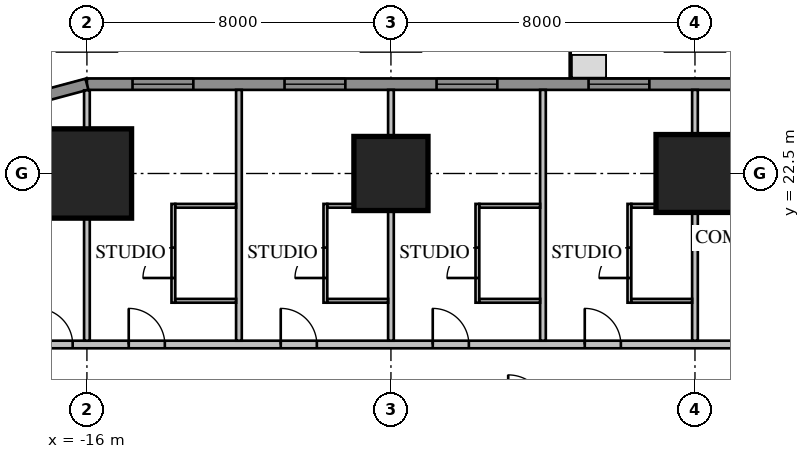
"""IFC4 building model, lengths in metres.
Left out: names, types, materials, properties, quantities, classifications, styles, units other than length and angle.
Written with IfcOpenShell. Run it as: python <this file> out.ifc"""

import sys

from ifc_helpers import new_model, si_unit, direction, frame, frame_2d, origin, origin_2d, place, context, subcontext, project, spatial, rectangle, extrude, element, fill, save


model = new_model("IFC4")
c1 = context("Model", 3, precision=1e-05, world=origin(), true_north=direction((0.0, 1.0)))
c2 = subcontext(c1, "Body", "Model", "MODEL_VIEW")
j1 = project(units=[si_unit("LENGTHUNIT", "METRE"), si_unit("PLANEANGLEUNIT", "RADIAN")], contexts=[c1])
p1 = place(None, origin())
s1 = spatial("IfcSite", under=j1, at=p1, CompositionType="ELEMENT")
p2 = place(p1, origin())
s2 = spatial("IfcBuilding", under=s1, at=p2, CompositionType="ELEMENT")
p3 = place(p2, frame((0.0, 0.0, 42.95)))
s3 = spatial("IfcBuildingStorey", under=s2, at=p3, CompositionType="ELEMENT", Elevation=42.95)
p4 = place(p3, frame((0.0, 22.5, 0.0), z_axis=(0.0, 0.0, 1.0), x_axis=(1.0, 0.0, 0.0)))
e1 = element("IfcColumn", 1, at=p4, inside=s3, PredefinedType="COLUMN", context=c2, shape_type="SweptSolid", body=[
    extrude(rectangle(XDim=2.05, YDim=2.05, at=origin_2d()), origin(), (0.0, 0.0, 1.0), 3.85),
])
p5 = place(p3, frame((-8.0, 22.5, 0.0), z_axis=(0.0, 0.0, 1.0), x_axis=(1.0, 0.0, 0.0)))
e2 = element("IfcColumn", 2, at=p5, inside=s3, PredefinedType="COLUMN", context=c2, shape_type="SweptSolid", body=[
    extrude(rectangle(XDim=1.95, YDim=1.95, at=origin_2d()), origin(), (0.0, 0.0, 1.0), 3.85),
])
p6 = place(p3, frame((-16.0, 22.5, 0.0), z_axis=(0.0, 0.0, 1.0), x_axis=(1.0, 0.0, 0.0)))
e3 = element("IfcColumn", 3, at=p6, inside=s3, PredefinedType="COLUMN", context=c2, shape_type="SweptSolid", body=[
    extrude(rectangle(XDim=2.35, YDim=2.35, at=origin_2d()), origin(), (0.0, 0.0, 1.0), 3.85),
])
p7 = place(p3, frame((16.0, 24.85, 0.0), z_axis=(0.0, 0.0, 1.0), x_axis=(-1.0, 0.0, 0.0)))
e4 = element("IfcWall", 4, at=p7, inside=s3, PredefinedType="SOLIDWALL", context=c2, shape_type="SweptSolid", body=[
    extrude(rectangle(XDim=32.0, YDim=0.3, at=frame_2d((16.0, 0.0))), origin(), (0.0, 0.0, 1.0), 3.65),
])
p8 = place(p7, frame((1.2, 0.0, 0.75)))
e5 = element("IfcOpeningElement", 5, at=p8, cuts=e4, PredefinedType="OPENING", context=c2, shape_type="SweptSolid", body=[
    extrude(rectangle(XDim=1.6, YDim=1.8, at=frame_2d((0.8, 0.9))), frame((0.0, 0.17, 0.0), z_axis=(0.0, -1.0, 0.0), x_axis=(1.0, 0.0, 0.0)), (0.0, 0.0, 1.0), 0.34),
])
p9 = place(p7, frame((5.2, 0.0, 0.75)))
e6 = element("IfcOpeningElement", 6, at=p9, cuts=e4, PredefinedType="OPENING", context=c2, shape_type="SweptSolid", body=[
    extrude(rectangle(XDim=1.6, YDim=1.8, at=frame_2d((0.8, 0.9))), frame((0.0, 0.17, 0.0), z_axis=(0.0, -1.0, 0.0), x_axis=(1.0, 0.0, 0.0)), (0.0, 0.0, 1.0), 0.34),
])
p10 = place(p7, frame((17.2, 0.0, 0.75)))
e7 = element("IfcOpeningElement", 7, at=p10, cuts=e4, PredefinedType="OPENING", context=c2, shape_type="SweptSolid", body=[
    extrude(rectangle(XDim=1.6, YDim=1.8, at=frame_2d((0.8, 0.9))), frame((0.0, 0.17, 0.0), z_axis=(0.0, -1.0, 0.0), x_axis=(1.0, 0.0, 0.0)), (0.0, 0.0, 1.0), 0.34),
])
p11 = place(p7, frame((21.2, 0.0, 0.75)))
e8 = element("IfcOpeningElement", 8, at=p11, cuts=e4, PredefinedType="OPENING", context=c2, shape_type="SweptSolid", body=[
    extrude(rectangle(XDim=1.6, YDim=1.8, at=frame_2d((0.8, 0.9))), frame((0.0, 0.17, 0.0), z_axis=(0.0, -1.0, 0.0), x_axis=(1.0, 0.0, 0.0)), (0.0, 0.0, 1.0), 0.34),
])
p12 = place(p7, frame((25.2, 0.0, 0.75)))
e9 = element("IfcOpeningElement", 9, at=p12, cuts=e4, PredefinedType="OPENING", context=c2, shape_type="SweptSolid", body=[
    extrude(rectangle(XDim=1.6, YDim=1.8, at=frame_2d((0.8, 0.9))), frame((0.0, 0.17, 0.0), z_axis=(0.0, -1.0, 0.0), x_axis=(1.0, 0.0, 0.0)), (0.0, 0.0, 1.0), 0.34),
])
p13 = place(p7, frame((29.2, 0.0, 0.75)))
e10 = element("IfcOpeningElement", 10, at=p13, cuts=e4, PredefinedType="OPENING", context=c2, shape_type="SweptSolid", body=[
    extrude(rectangle(XDim=1.6, YDim=1.8, at=frame_2d((0.8, 0.9))), frame((0.0, 0.17, 0.0), z_axis=(0.0, -1.0, 0.0), x_axis=(1.0, 0.0, 0.0)), (0.0, 0.0, 1.0), 0.34),
])
p14 = place(p7, frame((8.8, 0.0, 0.75)))
e11 = element("IfcOpeningElement", 11, at=p14, cuts=e4, PredefinedType="OPENING", context=c2, shape_type="SweptSolid", body=[
    extrude(rectangle(XDim=2.4, YDim=1.8, at=frame_2d((1.2, 0.9))), frame((0.0, 0.17, 0.0), z_axis=(0.0, -1.0, 0.0), x_axis=(1.0, 0.0, 0.0)), (0.0, 0.0, 1.0), 0.34),
])
p15 = place(p7, frame((13.812, 0.0, 0.0)))
e12 = element("IfcOpeningElement", 12, at=p15, cuts=e4, PredefinedType="OPENING", context=c2, shape_type="SweptSolid", body=[
    extrude(rectangle(XDim=1.0, YDim=2.4, at=frame_2d((0.5, 1.2))), frame((0.0, 0.17, 0.0), z_axis=(0.0, -1.0, 0.0), x_axis=(1.0, 0.0, 0.0)), (0.0, 0.0, 1.0), 0.34),
])
p16 = place(p3, frame((-16.0, 24.85, 0.0), z_axis=(0.0, 0.0, 1.0), x_axis=(-0.965920218567, -0.258839972501, 0.0)))
e13 = element("IfcWall", 13, at=p16, inside=s3, PredefinedType="SOLIDWALL", context=c2, shape_type="SweptSolid", body=[
    extrude(rectangle(XDim=4.581, YDim=0.3, at=frame_2d((2.291, 0.0))), origin(), (0.0, 0.0, 1.0), 3.65),
])
p17 = place(p3, frame((18.0, 18.0, 0.0), z_axis=(0.0, 0.0, 1.0), x_axis=(-1.0, 0.0, 0.0)))
e14 = element("IfcWall", 14, at=p17, inside=s3, PredefinedType="PARTITIONING", context=c2, shape_type="SweptSolid", body=[
    extrude(rectangle(XDim=36.0, YDim=0.2, at=frame_2d((18.0, 0.0))), origin(), (0.0, 0.0, 1.0), 3.65),
])
p18 = place(p17, frame((0.375, 0.0, 0.0)))
e15 = element("IfcOpeningElement", 15, at=p18, cuts=e14, PredefinedType="OPENING", context=c2, shape_type="SweptSolid", body=[
    extrude(rectangle(XDim=1.0, YDim=2.1, at=frame_2d((0.5, 1.05))), frame((0.0, 0.12, 0.0), z_axis=(0.0, -1.0, 0.0), x_axis=(1.0, 0.0, 0.0)), (0.0, 0.0, 1.0), 0.24),
])
p19 = place(p17, frame((3.95, 0.0, 0.0)))
e16 = element("IfcOpeningElement", 16, at=p19, cuts=e14, PredefinedType="OPENING", context=c2, shape_type="SweptSolid", body=[
    extrude(rectangle(XDim=0.95, YDim=2.1, at=frame_2d((0.475, 1.05))), frame((0.0, 0.12, 0.0), z_axis=(0.0, -1.0, 0.0), x_axis=(1.0, 0.0, 0.0)), (0.0, 0.0, 1.0), 0.24),
])
p20 = place(p17, frame((7.95, 0.0, 0.0)))
e17 = element("IfcOpeningElement", 17, at=p20, cuts=e14, PredefinedType="OPENING", context=c2, shape_type="SweptSolid", body=[
    extrude(rectangle(XDim=0.95, YDim=2.1, at=frame_2d((0.475, 1.05))), frame((0.0, 0.12, 0.0), z_axis=(0.0, -1.0, 0.0), x_axis=(1.0, 0.0, 0.0)), (0.0, 0.0, 1.0), 0.24),
])
p21 = place(p17, frame((19.95, 0.0, 0.0)))
e18 = element("IfcOpeningElement", 18, at=p21, cuts=e14, PredefinedType="OPENING", context=c2, shape_type="SweptSolid", body=[
    extrude(rectangle(XDim=0.95, YDim=2.1, at=frame_2d((0.475, 1.05))), frame((0.0, 0.12, 0.0), z_axis=(0.0, -1.0, 0.0), x_axis=(1.0, 0.0, 0.0)), (0.0, 0.0, 1.0), 0.24),
])
p22 = place(p17, frame((23.95, 0.0, 0.0)))
e19 = element("IfcOpeningElement", 19, at=p22, cuts=e14, PredefinedType="OPENING", context=c2, shape_type="SweptSolid", body=[
    extrude(rectangle(XDim=0.95, YDim=2.1, at=frame_2d((0.475, 1.05))), frame((0.0, 0.12, 0.0), z_axis=(0.0, -1.0, 0.0), x_axis=(1.0, 0.0, 0.0)), (0.0, 0.0, 1.0), 0.24),
])
p23 = place(p17, frame((27.95, 0.0, 0.0)))
e20 = element("IfcOpeningElement", 20, at=p23, cuts=e14, PredefinedType="OPENING", context=c2, shape_type="SweptSolid", body=[
    extrude(rectangle(XDim=0.95, YDim=2.1, at=frame_2d((0.475, 1.05))), frame((0.0, 0.12, 0.0), z_axis=(0.0, -1.0, 0.0), x_axis=(1.0, 0.0, 0.0)), (0.0, 0.0, 1.0), 0.24),
])
p24 = place(p17, frame((31.95, 0.0, 0.0)))
e21 = element("IfcOpeningElement", 21, at=p24, cuts=e14, PredefinedType="OPENING", context=c2, shape_type="SweptSolid", body=[
    extrude(rectangle(XDim=0.95, YDim=2.1, at=frame_2d((0.475, 1.05))), frame((0.0, 0.12, 0.0), z_axis=(0.0, -1.0, 0.0), x_axis=(1.0, 0.0, 0.0)), (0.0, 0.0, 1.0), 0.24),
])
p25 = place(p17, frame((34.375, 0.0, 0.0)))
e22 = element("IfcOpeningElement", 22, at=p25, cuts=e14, PredefinedType="OPENING", context=c2, shape_type="SweptSolid", body=[
    extrude(rectangle(XDim=0.95, YDim=2.1, at=frame_2d((0.475, 1.05))), frame((0.0, 0.12, 0.0), z_axis=(0.0, -1.0, 0.0), x_axis=(1.0, 0.0, 0.0)), (0.0, 0.0, 1.0), 0.24),
])
p26 = place(p17, frame((11.2, 0.0, 0.0)))
e23 = element("IfcOpeningElement", 23, at=p26, cuts=e14, PredefinedType="OPENING", context=c2, shape_type="SweptSolid", body=[
    extrude(rectangle(XDim=1.0, YDim=2.1, at=frame_2d((0.5, 1.05))), frame((0.0, 0.12, 0.0), z_axis=(0.0, -1.0, 0.0), x_axis=(1.0, 0.0, 0.0)), (0.0, 0.0, 1.0), 0.24),
])
p27 = place(p17, frame((15.2, 0.0, 0.0)))
e24 = element("IfcOpeningElement", 24, at=p27, cuts=e14, PredefinedType="OPENING", context=c2, shape_type="SweptSolid", body=[
    extrude(rectangle(XDim=1.0, YDim=2.1, at=frame_2d((0.5, 1.05))), frame((0.0, 0.12, 0.0), z_axis=(0.0, -1.0, 0.0), x_axis=(1.0, 0.0, 0.0)), (0.0, 0.0, 1.0), 0.24),
])
p28 = place(p3, frame((0.0, 18.1, 0.0), z_axis=(0.0, 0.0, 1.0), x_axis=(0.0, 1.0, 0.0)))
e25 = element("IfcWall", 25, at=p28, inside=s3, PredefinedType="PARTITIONING", context=c2, shape_type="SweptSolid", body=[
    extrude(rectangle(XDim=6.6, YDim=0.15, at=frame_2d((3.3, 0.0))), origin(), (0.0, 0.0, 1.0), 2.809),
])
for number, where, z_axis, x_axis in (
    (26, (-4.0, 18.1, 0.0), (0.0, 0.0, 1.0), (0.0, 1.0, 0.0)),
    (27, (-8.0, 18.1, 0.0), (0.0, 0.0, 1.0), (0.0, 1.0, 0.0)),
    (28, (-12.0, 18.1, 0.0), (0.0, 0.0, 1.0), (0.0, 1.0, 0.0)),
):
    element("IfcWall", number, at=place(p3, frame(where, z_axis=z_axis, x_axis=x_axis)), inside=s3, PredefinedType="PARTITIONING", context=c2, shape_type="SweptSolid", body=[
        extrude(rectangle(XDim=6.6, YDim=0.15, at=frame_2d((3.3, 0.0))), origin(), (0.0, 0.0, 1.0), 3.65),
    ])
p29 = place(p3, frame((-16.0, 18.1, 0.0), z_axis=(0.0, 0.0, 1.0), x_axis=(0.0, 1.0, 0.0)))
e29 = element("IfcWall", 29, at=p29, inside=s3, PredefinedType="PARTITIONING", context=c2, shape_type="SweptSolid", body=[
    extrude(rectangle(XDim=6.589, YDim=0.15, at=frame_2d((3.295, 0.0))), origin(), (0.0, 0.0, 1.0), 3.65),
])
p30 = place(p3, frame((-1.725, 19.1, 0.0), z_axis=(0.0, 0.0, 1.0), x_axis=(0.0, 1.0, 0.0)))
e30 = element("IfcWall", 30, at=p30, inside=s3, PredefinedType="PARTITIONING", context=c2, shape_type="SweptSolid", body=[
    extrude(rectangle(XDim=2.6, YDim=0.1, at=frame_2d((1.3, 0.0))), origin(), (0.0, 0.0, 1.0), 3.65),
])
p31 = place(p30, frame((0.65, 0.0, 0.0)))
e31 = element("IfcOpeningElement", 31, at=p31, cuts=e30, PredefinedType="OPENING", context=c2, shape_type="SweptSolid", body=[
    extrude(rectangle(XDim=0.8, YDim=2.1, at=frame_2d((0.4, 1.05))), frame((0.0, 0.07, 0.0), z_axis=(0.0, -1.0, 0.0), x_axis=(1.0, 0.0, 0.0)), (0.0, 0.0, 1.0), 0.14),
])
p32 = place(p3, frame((-0.075, 21.65, 0.0), z_axis=(0.0, 0.0, 1.0), x_axis=(-1.0, 0.0, 0.0)))
e32 = element("IfcWall", 32, at=p32, inside=s3, PredefinedType="PARTITIONING", context=c2, shape_type="SweptSolid", body=[
    extrude(rectangle(XDim=1.6, YDim=0.1, at=frame_2d((0.8, 0.0))), origin(), (0.0, 0.0, 1.0), 3.65),
])
p33 = place(p3, frame((-0.075, 19.15, 0.0), z_axis=(0.0, 0.0, 1.0), x_axis=(-1.0, 0.0, 0.0)))
e33 = element("IfcWall", 33, at=p33, inside=s3, PredefinedType="PARTITIONING", context=c2, shape_type="SweptSolid", body=[
    extrude(rectangle(XDim=1.6, YDim=0.1, at=frame_2d((0.8, 0.0))), origin(), (0.0, 0.0, 1.0), 3.122),
])
p34 = place(p3, frame((-5.725, 19.1, 0.0), z_axis=(0.0, 0.0, 1.0), x_axis=(0.0, 1.0, 0.0)))
e34 = element("IfcWall", 34, at=p34, inside=s3, PredefinedType="PARTITIONING", context=c2, shape_type="SweptSolid", body=[
    extrude(rectangle(XDim=2.6, YDim=0.1, at=frame_2d((1.3, 0.0))), origin(), (0.0, 0.0, 1.0), 3.65),
])
p35 = place(p34, frame((0.65, 0.0, 0.0)))
e35 = element("IfcOpeningElement", 35, at=p35, cuts=e34, PredefinedType="OPENING", context=c2, shape_type="SweptSolid", body=[
    extrude(rectangle(XDim=0.8, YDim=2.1, at=frame_2d((0.4, 1.05))), frame((0.0, 0.07, 0.0), z_axis=(0.0, -1.0, 0.0), x_axis=(1.0, 0.0, 0.0)), (0.0, 0.0, 1.0), 0.14),
])
p36 = place(p3, frame((-4.075, 21.65, 0.0), z_axis=(0.0, 0.0, 1.0), x_axis=(-1.0, 0.0, 0.0)))
e36 = element("IfcWall", 36, at=p36, inside=s3, PredefinedType="PARTITIONING", context=c2, shape_type="SweptSolid", body=[
    extrude(rectangle(XDim=1.6, YDim=0.1, at=frame_2d((0.8, 0.0))), origin(), (0.0, 0.0, 1.0), 3.65),
])
p37 = place(p3, frame((-4.075, 19.15, 0.0), z_axis=(0.0, 0.0, 1.0), x_axis=(-1.0, 0.0, 0.0)))
e37 = element("IfcWall", 37, at=p37, inside=s3, PredefinedType="PARTITIONING", context=c2, shape_type="SweptSolid", body=[
    extrude(rectangle(XDim=1.6, YDim=0.1, at=frame_2d((0.8, 0.0))), origin(), (0.0, 0.0, 1.0), 3.122),
])
p38 = place(p3, frame((-9.725, 19.1, 0.0), z_axis=(0.0, 0.0, 1.0), x_axis=(0.0, 1.0, 0.0)))
e38 = element("IfcWall", 38, at=p38, inside=s3, PredefinedType="PARTITIONING", context=c2, shape_type="SweptSolid", body=[
    extrude(rectangle(XDim=2.6, YDim=0.1, at=frame_2d((1.3, 0.0))), origin(), (0.0, 0.0, 1.0), 3.65),
])
p39 = place(p38, frame((0.65, 0.0, 0.0)))
e39 = element("IfcOpeningElement", 39, at=p39, cuts=e38, PredefinedType="OPENING", context=c2, shape_type="SweptSolid", body=[
    extrude(rectangle(XDim=0.8, YDim=2.1, at=frame_2d((0.4, 1.05))), frame((0.0, 0.07, 0.0), z_axis=(0.0, -1.0, 0.0), x_axis=(1.0, 0.0, 0.0)), (0.0, 0.0, 1.0), 0.14),
])
p40 = place(p3, frame((-8.075, 21.65, 0.0), z_axis=(0.0, 0.0, 1.0), x_axis=(-1.0, 0.0, 0.0)))
e40 = element("IfcWall", 40, at=p40, inside=s3, PredefinedType="PARTITIONING", context=c2, shape_type="SweptSolid", body=[
    extrude(rectangle(XDim=1.6, YDim=0.1, at=frame_2d((0.8, 0.0))), origin(), (0.0, 0.0, 1.0), 3.65),
])
p41 = place(p3, frame((-8.075, 19.15, 0.0), z_axis=(0.0, 0.0, 1.0), x_axis=(-1.0, 0.0, 0.0)))
e41 = element("IfcWall", 41, at=p41, inside=s3, PredefinedType="PARTITIONING", context=c2, shape_type="SweptSolid", body=[
    extrude(rectangle(XDim=1.6, YDim=0.1, at=frame_2d((0.8, 0.0))), origin(), (0.0, 0.0, 1.0), 3.122),
])
p42 = place(p3, frame((-13.725, 19.1, 0.0), z_axis=(0.0, 0.0, 1.0), x_axis=(0.0, 1.0, 0.0)))
e42 = element("IfcWall", 42, at=p42, inside=s3, PredefinedType="PARTITIONING", context=c2, shape_type="SweptSolid", body=[
    extrude(rectangle(XDim=2.6, YDim=0.1, at=frame_2d((1.3, 0.0))), origin(), (0.0, 0.0, 1.0), 3.65),
])
p43 = place(p42, frame((0.65, 0.0, 0.0)))
e43 = element("IfcOpeningElement", 43, at=p43, cuts=e42, PredefinedType="OPENING", context=c2, shape_type="SweptSolid", body=[
    extrude(rectangle(XDim=0.8, YDim=2.1, at=frame_2d((0.4, 1.05))), frame((0.0, 0.07, 0.0), z_axis=(0.0, -1.0, 0.0), x_axis=(1.0, 0.0, 0.0)), (0.0, 0.0, 1.0), 0.14),
])
p44 = place(p3, frame((-12.075, 21.65, 0.0), z_axis=(0.0, 0.0, 1.0), x_axis=(-1.0, 0.0, 0.0)))
e44 = element("IfcWall", 44, at=p44, inside=s3, PredefinedType="PARTITIONING", context=c2, shape_type="SweptSolid", body=[
    extrude(rectangle(XDim=1.6, YDim=0.1, at=frame_2d((0.8, 0.0))), origin(), (0.0, 0.0, 1.0), 3.65),
])
p45 = place(p3, frame((-12.075, 19.15, 0.0), z_axis=(0.0, 0.0, 1.0), x_axis=(-1.0, 0.0, 0.0)))
e45 = element("IfcWall", 45, at=p45, inside=s3, PredefinedType="PARTITIONING", context=c2, shape_type="SweptSolid", body=[
    extrude(rectangle(XDim=1.6, YDim=0.1, at=frame_2d((0.8, 0.0))), origin(), (0.0, 0.0, 1.0), 3.122),
])
p46 = place(p10, origin())
e46 = element("IfcWindow", 46, at=p46, inside=s3, PartitioningType="SINGLE_PANEL", PredefinedType="WINDOW", context=c2, shape_type="SweptSolid", body=[
    extrude(rectangle(XDim=1.6, YDim=1.8, at=frame_2d((0.8, 0.9))), frame((0.0, 0.03, 0.0), z_axis=(0.0, -1.0, 0.0), x_axis=(1.0, 0.0, 0.0)), (0.0, 0.0, 1.0), 0.06),
])
fill(e7, e46)
p47 = place(p11, origin())
e47 = element("IfcWindow", 47, at=p47, inside=s3, PartitioningType="SINGLE_PANEL", PredefinedType="WINDOW", context=c2, shape_type="SweptSolid", body=[
    extrude(rectangle(XDim=1.6, YDim=1.8, at=frame_2d((0.8, 0.9))), frame((0.0, 0.03, 0.0), z_axis=(0.0, -1.0, 0.0), x_axis=(1.0, 0.0, 0.0)), (0.0, 0.0, 1.0), 0.06),
])
fill(e8, e47)
p48 = place(p12, origin())
e48 = element("IfcWindow", 48, at=p48, inside=s3, PartitioningType="SINGLE_PANEL", PredefinedType="WINDOW", context=c2, shape_type="SweptSolid", body=[
    extrude(rectangle(XDim=1.6, YDim=1.8, at=frame_2d((0.8, 0.9))), frame((0.0, 0.03, 0.0), z_axis=(0.0, -1.0, 0.0), x_axis=(1.0, 0.0, 0.0)), (0.0, 0.0, 1.0), 0.06),
])
fill(e9, e48)
p49 = place(p13, origin())
e49 = element("IfcWindow", 49, at=p49, inside=s3, PartitioningType="SINGLE_PANEL", PredefinedType="WINDOW", context=c2, shape_type="SweptSolid", body=[
    extrude(rectangle(XDim=1.6, YDim=1.8, at=frame_2d((0.8, 0.9))), frame((0.0, 0.03, 0.0), z_axis=(0.0, -1.0, 0.0), x_axis=(1.0, 0.0, 0.0)), (0.0, 0.0, 1.0), 0.06),
])
fill(e10, e49)
p50 = place(p21, origin())
e50 = element("IfcDoor", 50, at=p50, inside=s3, OperationType="SINGLE_SWING_RIGHT", PredefinedType="DOOR", context=c2, shape_type="SweptSolid", body=[
    extrude(rectangle(XDim=0.95, YDim=2.1, at=frame_2d((0.475, 1.05))), frame((0.0, 0.025, 0.0), z_axis=(0.0, -1.0, 0.0), x_axis=(1.0, 0.0, 0.0)), (0.0, 0.0, 1.0), 0.05),
])
fill(e18, e50)
p51 = place(p31, origin())
e51 = element("IfcDoor", 51, at=p51, inside=s3, OperationType="SINGLE_SWING_LEFT", PredefinedType="DOOR", context=c2, shape_type="SweptSolid", body=[
    extrude(rectangle(XDim=0.8, YDim=2.1, at=frame_2d((0.4, 1.05))), frame((0.0, 0.025, 0.0), z_axis=(0.0, -1.0, 0.0), x_axis=(1.0, 0.0, 0.0)), (0.0, 0.0, 1.0), 0.05),
])
fill(e31, e51)
p52 = place(p22, origin())
e52 = element("IfcDoor", 52, at=p52, inside=s3, OperationType="SINGLE_SWING_RIGHT", PredefinedType="DOOR", context=c2, shape_type="SweptSolid", body=[
    extrude(rectangle(XDim=0.95, YDim=2.1, at=frame_2d((0.475, 1.05))), frame((0.0, 0.025, 0.0), z_axis=(0.0, -1.0, 0.0), x_axis=(1.0, 0.0, 0.0)), (0.0, 0.0, 1.0), 0.05),
])
fill(e19, e52)
p53 = place(p35, origin())
e53 = element("IfcDoor", 53, at=p53, inside=s3, OperationType="SINGLE_SWING_LEFT", PredefinedType="DOOR", context=c2, shape_type="SweptSolid", body=[
    extrude(rectangle(XDim=0.8, YDim=2.1, at=frame_2d((0.4, 1.05))), frame((0.0, 0.025, 0.0), z_axis=(0.0, -1.0, 0.0), x_axis=(1.0, 0.0, 0.0)), (0.0, 0.0, 1.0), 0.05),
])
fill(e35, e53)
p54 = place(p23, origin())
e54 = element("IfcDoor", 54, at=p54, inside=s3, OperationType="SINGLE_SWING_RIGHT", PredefinedType="DOOR", context=c2, shape_type="SweptSolid", body=[
    extrude(rectangle(XDim=0.95, YDim=2.1, at=frame_2d((0.475, 1.05))), frame((0.0, 0.025, 0.0), z_axis=(0.0, -1.0, 0.0), x_axis=(1.0, 0.0, 0.0)), (0.0, 0.0, 1.0), 0.05),
])
fill(e20, e54)
p55 = place(p39, origin())
e55 = element("IfcDoor", 55, at=p55, inside=s3, OperationType="SINGLE_SWING_LEFT", PredefinedType="DOOR", context=c2, shape_type="SweptSolid", body=[
    extrude(rectangle(XDim=0.8, YDim=2.1, at=frame_2d((0.4, 1.05))), frame((0.0, 0.025, 0.0), z_axis=(0.0, -1.0, 0.0), x_axis=(1.0, 0.0, 0.0)), (0.0, 0.0, 1.0), 0.05),
])
fill(e39, e55)
p56 = place(p24, origin())
e56 = element("IfcDoor", 56, at=p56, inside=s3, OperationType="SINGLE_SWING_RIGHT", PredefinedType="DOOR", context=c2, shape_type="SweptSolid", body=[
    extrude(rectangle(XDim=0.95, YDim=2.1, at=frame_2d((0.475, 1.05))), frame((0.0, 0.025, 0.0), z_axis=(0.0, -1.0, 0.0), x_axis=(1.0, 0.0, 0.0)), (0.0, 0.0, 1.0), 0.05),
])
fill(e21, e56)
p57 = place(p43, origin())
e57 = element("IfcDoor", 57, at=p57, inside=s3, OperationType="SINGLE_SWING_LEFT", PredefinedType="DOOR", context=c2, shape_type="SweptSolid", body=[
    extrude(rectangle(XDim=0.8, YDim=2.1, at=frame_2d((0.4, 1.05))), frame((0.0, 0.025, 0.0), z_axis=(0.0, -1.0, 0.0), x_axis=(1.0, 0.0, 0.0)), (0.0, 0.0, 1.0), 0.05),
])
fill(e43, e57)
p58 = place(p25, origin())
e58 = element("IfcDoor", 58, at=p58, inside=s3, OperationType="SINGLE_SWING_RIGHT", PredefinedType="DOOR", context=c2, shape_type="SweptSolid", body=[
    extrude(rectangle(XDim=0.95, YDim=2.1, at=frame_2d((0.475, 1.05))), frame((0.0, 0.025, 0.0), z_axis=(0.0, -1.0, 0.0), x_axis=(1.0, 0.0, 0.0)), (0.0, 0.0, 1.0), 0.05),
])
fill(e22, e58)
save(model, sys.argv[1])
